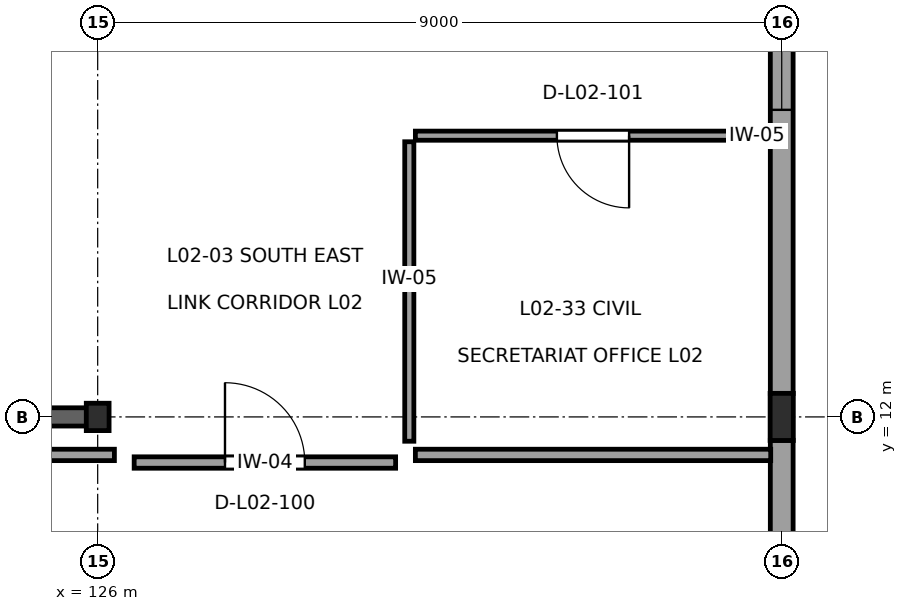
"""IFC4 building model, lengths in metres.
Left out: names, types, materials, properties, quantities, classifications, styles, units other than length and angle.
Written with IfcOpenShell. Run it as: python <this file> out.ifc"""

import sys

from ifc_helpers import new_model, si_unit, direction, frame, frame_2d, origin, origin_2d, place, context, subcontext, project, spatial, rectangle, i_section, extrude, element, fill, save


model = new_model("IFC4")
c1 = context("Model", 3, precision=1e-05, world=origin(), true_north=direction((0.0, 1.0)))
c2 = subcontext(c1, "Body", "Model", "MODEL_VIEW")
j1 = project(units=[si_unit("LENGTHUNIT", "METRE"), si_unit("PLANEANGLEUNIT", "RADIAN")], contexts=[c1])
p1 = place(None, origin())
s1 = spatial("IfcSite", under=j1, at=p1, CompositionType="ELEMENT")
p2 = place(p1, origin())
s2 = spatial("IfcBuilding", under=s1, at=p2, CompositionType="ELEMENT")
p3 = place(p2, frame((0.0, 0.0, 9.9)))
s3 = spatial("IfcBuildingStorey", under=s2, at=p3, CompositionType="ELEMENT", Elevation=9.9)
p4 = place(p3, frame((126.0, 12.0, 0.0), z_axis=(0.0, 0.0, 1.0), x_axis=(1.0, 0.0, 0.0)))
e1 = element("IfcColumn", 1, at=p4, inside=s3, PredefinedType="COLUMN", context=c2, shape_type="SweptSolid", body=[
    extrude(i_section(OverallWidth=0.3, OverallDepth=0.36, WebThickness=0.012, FlangeThickness=0.022, at=origin_2d()), origin(), (0.0, 0.0, 1.0), 4.5),
])
p5 = place(p3, frame((135.0, 12.0, 0.0), z_axis=(0.0, 0.0, 1.0), x_axis=(1.0, 0.0, 0.0)))
e2 = element("IfcColumn", 2, at=p5, inside=s3, PredefinedType="COLUMN", context=c2, shape_type="SweptSolid", body=[
    extrude(i_section(OverallWidth=0.305, OverallDepth=0.62, WebThickness=0.021, FlangeThickness=0.04, at=origin_2d()), origin(), (0.0, 0.0, 1.0), 4.5),
])
p6 = place(p3, frame((135.0, 0.008, 0.0), z_axis=(0.0, 0.0, 1.0), x_axis=(0.0, 1.0, 0.0)))
e3 = element("IfcWall", 3, at=p6, inside=s3, PredefinedType="SOLIDWALL", context=c2, shape_type="SweptSolid", body=[
    extrude(rectangle(XDim=11.684, YDim=0.3, at=frame_2d((5.842, 0.0))), origin(), (0.0, 0.0, 1.0), 3.825),
])
p7 = place(p6, frame((1.452, 0.0, 0.8)))
e4 = element("IfcOpeningElement", 4, at=p7, cuts=e3, PredefinedType="OPENING", context=c2, shape_type="SweptSolid", body=[
    extrude(rectangle(XDim=2.0, YDim=2.0, at=frame_2d((1.0, 1.0))), frame((0.0, 0.165, 0.0), z_axis=(0.0, -1.0, 0.0), x_axis=(1.0, 0.0, 0.0)), (0.0, 0.0, 1.0), 0.33),
])
p8 = place(p6, frame((7.412, 0.0, 0.8)))
e5 = element("IfcOpeningElement", 5, at=p8, cuts=e3, PredefinedType="OPENING", context=c2, shape_type="SweptSolid", body=[
    extrude(rectangle(XDim=2.0, YDim=2.0, at=frame_2d((1.0, 1.0))), frame((0.0, 0.165, 0.0), z_axis=(0.0, -1.0, 0.0), x_axis=(1.0, 0.0, 0.0)), (0.0, 0.0, 1.0), 0.33),
])
p9 = place(p3, frame((135.0, 12.308, 0.0), z_axis=(0.0, 0.0, 1.0), x_axis=(0.0, 1.0, 0.0)))
e6 = element("IfcWall", 6, at=p9, inside=s3, PredefinedType="SOLIDWALL", context=c2, shape_type="SweptSolid", body=[
    extrude(rectangle(XDim=11.336, YDim=0.3, at=frame_2d((5.668, 0.0))), origin(), (0.0, 0.0, 1.0), 3.825),
])
p10 = place(p9, frame((3.732, 0.0, 0.8)))
e7 = element("IfcOpeningElement", 7, at=p10, cuts=e6, PredefinedType="OPENING", context=c2, shape_type="SweptSolid", body=[
    extrude(rectangle(XDim=2.0, YDim=2.0, at=frame_2d((1.0, 1.0))), frame((0.0, 0.165, 0.0), z_axis=(0.0, -1.0, 0.0), x_axis=(1.0, 0.0, 0.0)), (0.0, 0.0, 1.0), 0.33),
])
p11 = place(p9, frame((7.162, 0.0, 0.8)))
e8 = element("IfcOpeningElement", 8, at=p11, cuts=e6, PredefinedType="OPENING", context=c2, shape_type="SweptSolid", body=[
    extrude(rectangle(XDim=2.0, YDim=2.0, at=frame_2d((1.0, 1.0))), frame((0.0, 0.165, 0.0), z_axis=(0.0, -1.0, 0.0), x_axis=(1.0, 0.0, 0.0)), (0.0, 0.0, 1.0), 0.33),
])
p12 = place(p3, frame((117.223, 12.0, 0.0), z_axis=(0.0, 0.0, 1.0), x_axis=(1.0, 0.0, 0.0)))
e9 = element("IfcWall", 9, at=p12, inside=s3, PredefinedType="SHEAR", context=c2, shape_type="SweptSolid", body=[
    extrude(rectangle(XDim=8.769, YDim=0.24, at=frame_2d((4.385, 0.0))), origin(), (0.0, 0.0, 1.0), 3.675),
])
p13 = place(p3, frame((130.18, 11.5, 0.0), z_axis=(0.0, 0.0, 1.0), x_axis=(1.0, 0.0, 0.0)))
e10 = element("IfcWall", 10, at=p13, inside=s3, PredefinedType="PARTITIONING", context=c2, shape_type="SweptSolid", body=[
    extrude(rectangle(XDim=4.675, YDim=0.15, at=frame_2d((2.337, 0.0))), origin(), (0.0, 0.0, 1.0), 4.14),
])
p14 = place(p3, frame((116.795, 11.5, 0.0), z_axis=(0.0, 0.0, 1.0), x_axis=(1.0, 0.0, 0.0)))
e11 = element("IfcWall", 11, at=p14, inside=s3, PredefinedType="PARTITIONING", context=c2, shape_type="SweptSolid", body=[
    extrude(rectangle(XDim=9.425, YDim=0.15, at=frame_2d((4.712, 0.0))), origin(), (0.0, 0.0, 1.0), 4.14),
])
p15 = place(p3, frame((126.48, 11.4, 0.0), z_axis=(0.0, 0.0, 1.0), x_axis=(1.0, 0.0, 0.0)))
e12 = element("IfcWall", 12, at=p15, inside=s3, PredefinedType="PARTITIONING", context=c2, shape_type="SweptSolid", body=[
    extrude(rectangle(XDim=3.44, YDim=0.15, at=frame_2d((1.72, 0.0))), origin(), (0.0, 0.0, 1.0), 4.14),
])
p16 = place(p15, frame((1.195, 0.0, 0.0)))
e13 = element("IfcOpeningElement", 13, at=p16, cuts=e12, PredefinedType="OPENING", context=c2, shape_type="SweptSolid", body=[
    extrude(rectangle(XDim=1.05, YDim=2.25, at=frame_2d((0.525, 1.125))), frame((0.0, 0.09, 0.0), z_axis=(0.0, -1.0, 0.0), x_axis=(1.0, 0.0, 0.0)), (0.0, 0.0, 1.0), 0.18),
])
p17 = place(p3, frame((130.1, 11.68, 0.0), z_axis=(0.0, 0.0, 1.0), x_axis=(0.0, 1.0, 0.0)))
e14 = element("IfcWall", 14, at=p17, inside=s3, PredefinedType="PARTITIONING", context=c2, shape_type="SweptSolid", body=[
    extrude(rectangle(XDim=3.94, YDim=0.12, at=frame_2d((1.97, 0.0))), origin(), (0.0, 0.0, 1.0), 4.14),
])
p18 = place(p3, frame((130.18, 15.7, 0.0), z_axis=(0.0, 0.0, 1.0), x_axis=(1.0, 0.0, 0.0)))
e15 = element("IfcWall", 15, at=p18, inside=s3, PredefinedType="PARTITIONING", context=c2, shape_type="SweptSolid", body=[
    extrude(rectangle(XDim=4.675, YDim=0.12, at=frame_2d((2.337, 0.0))), origin(), (0.0, 0.0, 1.0), 4.14),
])
p19 = place(p18, frame((1.862, 0.0, 0.0)))
e16 = element("IfcOpeningElement", 16, at=p19, cuts=e15, PredefinedType="OPENING", context=c2, shape_type="SweptSolid", body=[
    extrude(rectangle(XDim=0.95, YDim=2.15, at=frame_2d((0.475, 1.075))), frame((0.0, 0.075, 0.0), z_axis=(0.0, -1.0, 0.0), x_axis=(1.0, 0.0, 0.0)), (0.0, 0.0, 1.0), 0.15),
])
p20 = place(p10, origin())
e17 = element("IfcWindow", 17, at=p20, inside=s3, PartitioningType="SINGLE_PANEL", PredefinedType="WINDOW", context=c2, shape_type="SweptSolid", body=[
    extrude(rectangle(XDim=2.0, YDim=2.0, at=frame_2d((1.0, 1.0))), frame((0.0, 0.03, 0.0), z_axis=(0.0, -1.0, 0.0), x_axis=(1.0, 0.0, 0.0)), (0.0, 0.0, 1.0), 0.06),
])
fill(e7, e17)
p21 = place(p16, origin())
e18 = element("IfcDoor", 18, at=p21, inside=s3, OperationType="SINGLE_SWING_LEFT", PredefinedType="DOOR", context=c2, shape_type="SweptSolid", body=[
    extrude(rectangle(XDim=1.05, YDim=2.25, at=frame_2d((0.525, 1.125))), frame((0.0, 0.025, 0.0), z_axis=(0.0, -1.0, 0.0), x_axis=(1.0, 0.0, 0.0)), (0.0, 0.0, 1.0), 0.05),
])
fill(e13, e18)
p22 = place(p19, frame((0.95, 0.0, 0.0), z_axis=(0.0, 0.0, 1.0), x_axis=(-1.0, 0.0, 0.0)))
e19 = element("IfcDoor", 19, at=p22, inside=s3, OperationType="SINGLE_SWING_RIGHT", PredefinedType="DOOR", context=c2, shape_type="SweptSolid", body=[
    extrude(rectangle(XDim=0.95, YDim=2.15, at=frame_2d((0.475, 1.075))), frame((0.0, 0.025, 0.0), z_axis=(0.0, -1.0, 0.0), x_axis=(1.0, 0.0, 0.0)), (0.0, 0.0, 1.0), 0.05),
])
fill(e16, e19)
save(model, sys.argv[1])
